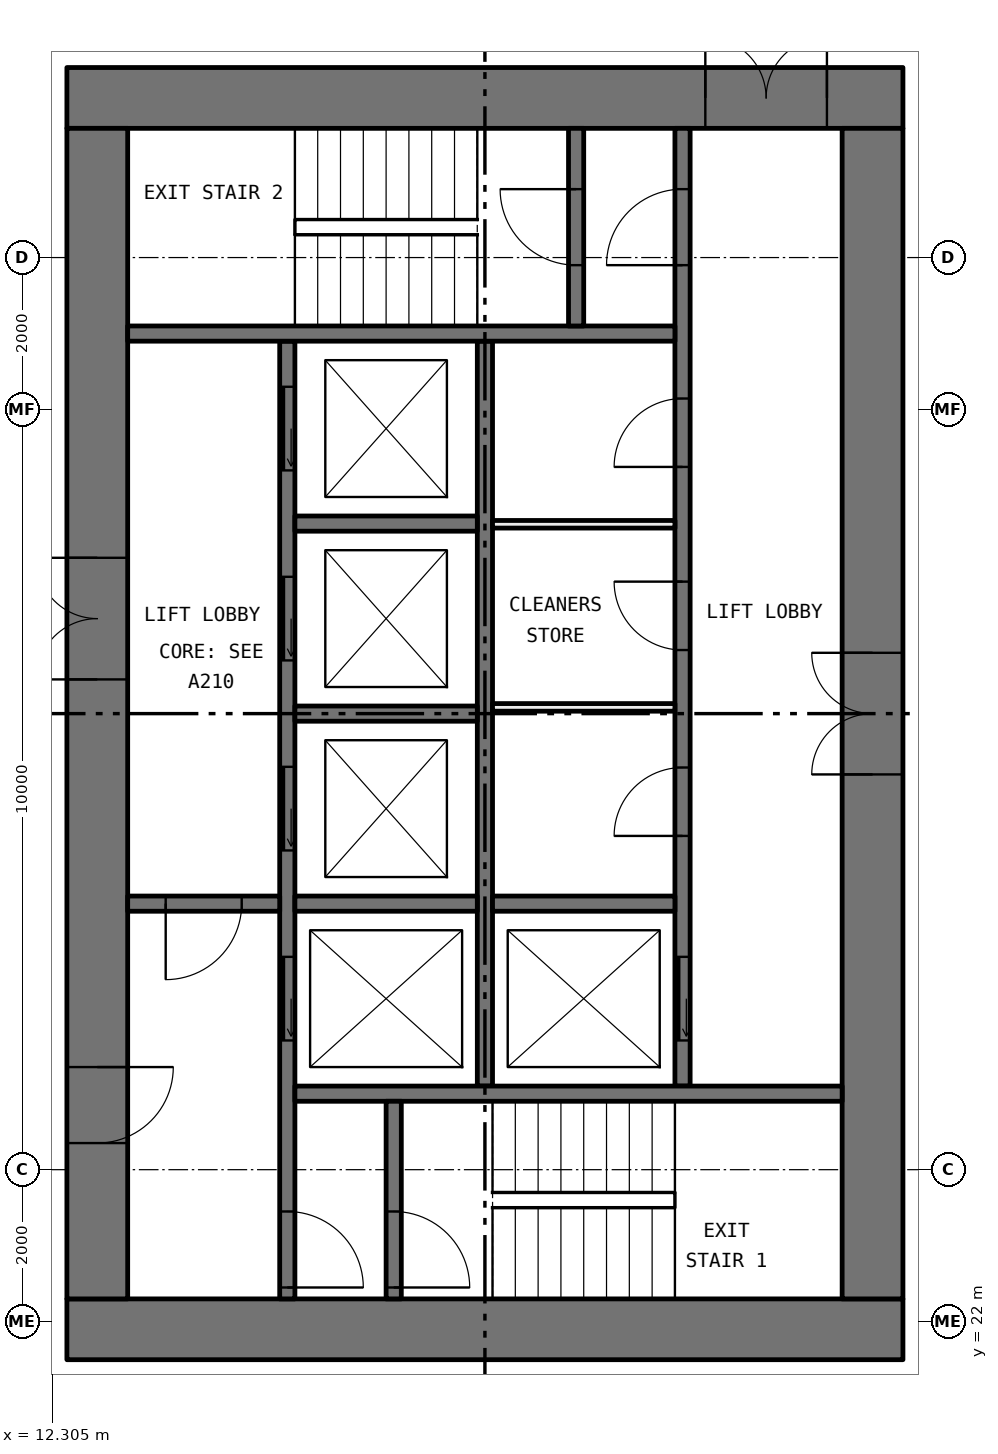
"""IFC4 building model, lengths in metres.
Left out: names, types, materials, properties, quantities, classifications, styles, units other than length and angle.
Written with IfcOpenShell. Run it as: python <this file> out.ifc"""

import sys

from ifc_helpers import new_model, si_unit, direction, frame, frame_2d, origin, place, context, subcontext, project, spatial, rectangle, extrude, element, fill, save


model = new_model("IFC4")
c1 = context("Model", 3, precision=1e-05, world=origin(), true_north=direction((0.0, 1.0)))
c2 = subcontext(c1, "Body", "Model", "MODEL_VIEW")
j1 = project(units=[si_unit("LENGTHUNIT", "METRE"), si_unit("PLANEANGLEUNIT", "RADIAN")], contexts=[c1])
p1 = place(None, origin())
s1 = spatial("IfcSite", under=j1, at=p1, CompositionType="ELEMENT")
p2 = place(p1, origin())
s2 = spatial("IfcBuilding", under=s1, at=p2, CompositionType="ELEMENT")
p3 = place(p2, frame((0.0, 0.0, 43.8)))
s3 = spatial("IfcBuildingStorey", under=s2, at=p3, CompositionType="ELEMENT", Elevation=43.8)
p4 = place(p3, frame((12.5, 21.9, 0.0), z_axis=(0.0, 0.0, 1.0), x_axis=(1.0, 0.0, 0.0)))
e1 = element("IfcWall", 1, at=p4, inside=s3, PredefinedType="SHEAR", context=c2, shape_type="SweptSolid", body=[
    extrude(rectangle(XDim=11.0, YDim=0.8, at=frame_2d((5.5, 0.0))), origin(), (0.0, 0.0, 1.0), 3.05),
])
p5 = place(p3, frame((12.5, 38.1, 0.0), z_axis=(0.0, 0.0, 1.0), x_axis=(1.0, 0.0, 0.0)))
e2 = element("IfcWall", 2, at=p5, inside=s3, PredefinedType="SHEAR", context=c2, shape_type="SweptSolid", body=[
    extrude(rectangle(XDim=11.0, YDim=0.8, at=frame_2d((5.5, 0.0))), origin(), (0.0, 0.0, 1.0), 3.05),
])
p6 = place(p5, frame((8.4, 0.0, 0.0)))
e3 = element("IfcOpeningElement", 3, at=p6, cuts=e2, PredefinedType="OPENING", context=c2, shape_type="SweptSolid", body=[
    extrude(rectangle(XDim=1.6, YDim=2.1, at=frame_2d((0.8, 1.05))), frame((0.0, 0.41, 0.0), z_axis=(0.0, -1.0, 0.0), x_axis=(1.0, 0.0, 0.0)), (0.0, 0.0, 1.0), 0.82),
])
p7 = place(p3, frame((12.9, 22.3, 0.0), z_axis=(0.0, 0.0, 1.0), x_axis=(0.0, 1.0, 0.0)))
e4 = element("IfcWall", 4, at=p7, inside=s3, PredefinedType="SHEAR", context=c2, shape_type="SweptSolid", body=[
    extrude(rectangle(XDim=15.4, YDim=0.8, at=frame_2d((7.7, 0.0))), origin(), (0.0, 0.0, 1.0), 3.05),
])
p8 = place(p7, frame((8.15, 0.0, 0.0)))
e5 = element("IfcOpeningElement", 5, at=p8, cuts=e4, PredefinedType="OPENING", context=c2, shape_type="SweptSolid", body=[
    extrude(rectangle(XDim=1.6, YDim=2.1, at=frame_2d((0.8, 1.05))), frame((0.0, 0.41, 0.0), z_axis=(0.0, -1.0, 0.0), x_axis=(1.0, 0.0, 0.0)), (0.0, 0.0, 1.0), 0.82),
])
p9 = place(p7, frame((2.05, 0.0, 0.0)))
e6 = element("IfcOpeningElement", 6, at=p9, cuts=e4, PredefinedType="OPENING", context=c2, shape_type="SweptSolid", body=[
    extrude(rectangle(XDim=1.0, YDim=2.1, at=frame_2d((0.5, 1.05))), frame((0.0, 0.41, 0.0), z_axis=(0.0, -1.0, 0.0), x_axis=(1.0, 0.0, 0.0)), (0.0, 0.0, 1.0), 0.82),
])
p10 = place(p3, frame((23.1, 22.3, 0.0), z_axis=(0.0, 0.0, 1.0), x_axis=(0.0, 1.0, 0.0)))
e7 = element("IfcWall", 7, at=p10, inside=s3, PredefinedType="SHEAR", context=c2, shape_type="SweptSolid", body=[
    extrude(rectangle(XDim=15.4, YDim=0.8, at=frame_2d((7.7, 0.0))), origin(), (0.0, 0.0, 1.0), 3.05),
])
p11 = place(p10, frame((6.9, 0.0, 0.0)))
e8 = element("IfcOpeningElement", 8, at=p11, cuts=e7, PredefinedType="OPENING", context=c2, shape_type="SweptSolid", body=[
    extrude(rectangle(XDim=1.6, YDim=2.1, at=frame_2d((0.8, 1.05))), frame((0.0, 0.41, 0.0), z_axis=(0.0, -1.0, 0.0), x_axis=(1.0, 0.0, 0.0)), (0.0, 0.0, 1.0), 0.82),
])
p12 = place(p3, frame((15.4, 22.3, 0.0), z_axis=(0.0, 0.0, 1.0), x_axis=(0.0, 1.0, 0.0)))
e9 = element("IfcWall", 9, at=p12, inside=s3, PredefinedType="SOLIDWALL", context=c2, shape_type="SweptSolid", body=[
    extrude(rectangle(XDim=12.6, YDim=0.2, at=frame_2d((6.3, 0.0))), origin(), (0.0, 0.0, 1.0), 3.05),
])
p13 = place(p12, frame((3.4, 0.0, 0.0)))
e10 = element("IfcOpeningElement", 10, at=p13, cuts=e9, PredefinedType="OPENING", context=c2, shape_type="SweptSolid", body=[
    extrude(rectangle(XDim=1.1, YDim=2.1, at=frame_2d((0.55, 1.05))), frame((0.0, 0.11, 0.0), z_axis=(0.0, -1.0, 0.0), x_axis=(1.0, 0.0, 0.0)), (0.0, 0.0, 1.0), 0.22),
])
p14 = place(p12, frame((5.9, 0.0, 0.0)))
e11 = element("IfcOpeningElement", 11, at=p14, cuts=e9, PredefinedType="OPENING", context=c2, shape_type="SweptSolid", body=[
    extrude(rectangle(XDim=1.1, YDim=2.1, at=frame_2d((0.55, 1.05))), frame((0.0, 0.11, 0.0), z_axis=(0.0, -1.0, 0.0), x_axis=(1.0, 0.0, 0.0)), (0.0, 0.0, 1.0), 0.22),
])
p15 = place(p12, frame((8.4, 0.0, 0.0)))
e12 = element("IfcOpeningElement", 12, at=p15, cuts=e9, PredefinedType="OPENING", context=c2, shape_type="SweptSolid", body=[
    extrude(rectangle(XDim=1.1, YDim=2.1, at=frame_2d((0.55, 1.05))), frame((0.0, 0.11, 0.0), z_axis=(0.0, -1.0, 0.0), x_axis=(1.0, 0.0, 0.0)), (0.0, 0.0, 1.0), 0.22),
])
p16 = place(p12, frame((10.9, 0.0, 0.0)))
e13 = element("IfcOpeningElement", 13, at=p16, cuts=e9, PredefinedType="OPENING", context=c2, shape_type="SweptSolid", body=[
    extrude(rectangle(XDim=1.1, YDim=2.1, at=frame_2d((0.55, 1.05))), frame((0.0, 0.11, 0.0), z_axis=(0.0, -1.0, 0.0), x_axis=(1.0, 0.0, 0.0)), (0.0, 0.0, 1.0), 0.22),
])
p17 = place(p12, frame((0.15, 0.0, 0.0)))
e14 = element("IfcOpeningElement", 14, at=p17, cuts=e9, PredefinedType="OPENING", context=c2, shape_type="SweptSolid", body=[
    extrude(rectangle(XDim=1.0, YDim=2.1, at=frame_2d((0.5, 1.05))), frame((0.0, 0.11, 0.0), z_axis=(0.0, -1.0, 0.0), x_axis=(1.0, 0.0, 0.0)), (0.0, 0.0, 1.0), 0.22),
])
p18 = place(p3, frame((20.6, 25.1, 0.0), z_axis=(0.0, 0.0, 1.0), x_axis=(0.0, 1.0, 0.0)))
e15 = element("IfcWall", 15, at=p18, inside=s3, PredefinedType="SOLIDWALL", context=c2, shape_type="SweptSolid", body=[
    extrude(rectangle(XDim=12.6, YDim=0.2, at=frame_2d((6.3, 0.0))), origin(), (0.0, 0.0, 1.0), 3.05),
])
p19 = place(p18, frame((0.6, 0.0, 0.0)))
e16 = element("IfcOpeningElement", 16, at=p19, cuts=e15, PredefinedType="OPENING", context=c2, shape_type="SweptSolid", body=[
    extrude(rectangle(XDim=1.1, YDim=2.1, at=frame_2d((0.55, 1.05))), frame((0.0, 0.11, 0.0), z_axis=(0.0, -1.0, 0.0), x_axis=(1.0, 0.0, 0.0)), (0.0, 0.0, 1.0), 0.22),
])
p20 = place(p18, frame((10.8, 0.0, 0.0)))
e17 = element("IfcOpeningElement", 17, at=p20, cuts=e15, PredefinedType="OPENING", context=c2, shape_type="SweptSolid", body=[
    extrude(rectangle(XDim=1.0, YDim=2.1, at=frame_2d((0.5, 1.05))), frame((0.0, 0.11, 0.0), z_axis=(0.0, -1.0, 0.0), x_axis=(1.0, 0.0, 0.0)), (0.0, 0.0, 1.0), 0.22),
])
p21 = place(p18, frame((3.291, 0.0, 0.0)))
e18 = element("IfcOpeningElement", 18, at=p21, cuts=e15, PredefinedType="OPENING", context=c2, shape_type="SweptSolid", body=[
    extrude(rectangle(XDim=0.9, YDim=2.1, at=frame_2d((0.45, 1.05))), frame((0.0, 0.11, 0.0), z_axis=(0.0, -1.0, 0.0), x_axis=(1.0, 0.0, 0.0)), (0.0, 0.0, 1.0), 0.22),
])
p22 = place(p18, frame((5.737, 0.0, 0.0)))
e19 = element("IfcOpeningElement", 19, at=p22, cuts=e15, PredefinedType="OPENING", context=c2, shape_type="SweptSolid", body=[
    extrude(rectangle(XDim=0.9, YDim=2.1, at=frame_2d((0.45, 1.05))), frame((0.0, 0.11, 0.0), z_axis=(0.0, -1.0, 0.0), x_axis=(1.0, 0.0, 0.0)), (0.0, 0.0, 1.0), 0.22),
])
p23 = place(p18, frame((8.146, 0.0, 0.0)))
e20 = element("IfcOpeningElement", 20, at=p23, cuts=e15, PredefinedType="OPENING", context=c2, shape_type="SweptSolid", body=[
    extrude(rectangle(XDim=0.9, YDim=2.1, at=frame_2d((0.45, 1.05))), frame((0.0, 0.11, 0.0), z_axis=(0.0, -1.0, 0.0), x_axis=(1.0, 0.0, 0.0)), (0.0, 0.0, 1.0), 0.22),
])
p24 = place(p3, frame((18.0, 25.1, 0.0), z_axis=(0.0, 0.0, 1.0), x_axis=(0.0, 1.0, 0.0)))
e21 = element("IfcWall", 21, at=p24, inside=s3, PredefinedType="SOLIDWALL", context=c2, shape_type="SweptSolid", body=[
    extrude(rectangle(XDim=9.8, YDim=0.2, at=frame_2d((4.9, 0.0))), origin(), (0.0, 0.0, 1.0), 3.05),
])
for number, where, z_axis, x_axis in (
    (22, (15.5, 25.0, 0.0), (0.0, 0.0, 1.0), (1.0, 0.0, 0.0)),
    (23, (13.3, 35.0, 0.0), (0.0, 0.0, 1.0), (1.0, 0.0, 0.0)),
):
    element("IfcWall", number, at=place(p3, frame(where, z_axis=z_axis, x_axis=x_axis)), inside=s3, PredefinedType="SOLIDWALL", context=c2, shape_type="SweptSolid", body=[
        extrude(rectangle(XDim=7.2, YDim=0.2, at=frame_2d((3.6, 0.0))), origin(), (0.0, 0.0, 1.0), 3.05),
    ])
p25 = place(p3, frame((13.3, 27.5, 0.0), z_axis=(0.0, 0.0, 1.0), x_axis=(1.0, 0.0, 0.0)))
e24 = element("IfcWall", 24, at=p25, inside=s3, PredefinedType="SOLIDWALL", context=c2, shape_type="SweptSolid", body=[
    extrude(rectangle(XDim=2.0, YDim=0.2, at=frame_2d((1.0, 0.0))), origin(), (0.0, 0.0, 1.0), 3.05),
])
p26 = place(p25, frame((0.5, 0.0, 0.0)))
e25 = element("IfcOpeningElement", 25, at=p26, cuts=e24, PredefinedType="OPENING", context=c2, shape_type="SweptSolid", body=[
    extrude(rectangle(XDim=1.0, YDim=2.1, at=frame_2d((0.5, 1.05))), frame((0.0, 0.11, 0.0), z_axis=(0.0, -1.0, 0.0), x_axis=(1.0, 0.0, 0.0)), (0.0, 0.0, 1.0), 0.22),
])
p27 = place(p3, frame((16.8, 22.3, 0.0), z_axis=(0.0, 0.0, 1.0), x_axis=(0.0, 1.0, 0.0)))
e26 = element("IfcWall", 26, at=p27, inside=s3, PredefinedType="SOLIDWALL", context=c2, shape_type="SweptSolid", body=[
    extrude(rectangle(XDim=2.6, YDim=0.2, at=frame_2d((1.3, 0.0))), origin(), (0.0, 0.0, 1.0), 3.05),
])
p28 = place(p27, frame((0.15, 0.0, 0.0)))
e27 = element("IfcOpeningElement", 27, at=p28, cuts=e26, PredefinedType="OPENING", context=c2, shape_type="SweptSolid", body=[
    extrude(rectangle(XDim=1.0, YDim=2.1, at=frame_2d((0.5, 1.05))), frame((0.0, 0.11, 0.0), z_axis=(0.0, -1.0, 0.0), x_axis=(1.0, 0.0, 0.0)), (0.0, 0.0, 1.0), 0.22),
])
p29 = place(p3, frame((19.2, 35.1, 0.0), z_axis=(0.0, 0.0, 1.0), x_axis=(0.0, 1.0, 0.0)))
e28 = element("IfcWall", 28, at=p29, inside=s3, PredefinedType="SOLIDWALL", context=c2, shape_type="SweptSolid", body=[
    extrude(rectangle(XDim=2.6, YDim=0.2, at=frame_2d((1.3, 0.0))), origin(), (0.0, 0.0, 1.0), 3.05),
])
p30 = place(p29, frame((0.8, 0.0, 0.0)))
e29 = element("IfcOpeningElement", 29, at=p30, cuts=e28, PredefinedType="OPENING", context=c2, shape_type="SweptSolid", body=[
    extrude(rectangle(XDim=1.0, YDim=2.1, at=frame_2d((0.5, 1.05))), frame((0.0, 0.11, 0.0), z_axis=(0.0, -1.0, 0.0), x_axis=(1.0, 0.0, 0.0)), (0.0, 0.0, 1.0), 0.22),
])
for number, where, z_axis, x_axis in (
    (30, (15.5, 27.5, 0.0), (0.0, 0.0, 1.0), (1.0, 0.0, 0.0)),
    (31, (15.5, 30.0, 0.0), (0.0, 0.0, 1.0), (1.0, 0.0, 0.0)),
    (32, (15.5, 32.5, 0.0), (0.0, 0.0, 1.0), (1.0, 0.0, 0.0)),
    (33, (18.1, 27.5, 0.0), (0.0, 0.0, 1.0), (1.0, 0.0, 0.0)),
):
    element("IfcWall", number, at=place(p3, frame(where, z_axis=z_axis, x_axis=x_axis)), inside=s3, PredefinedType="SOLIDWALL", context=c2, shape_type="SweptSolid", body=[
        extrude(rectangle(XDim=2.4, YDim=0.2, at=frame_2d((1.2, 0.0))), origin(), (0.0, 0.0, 1.0), 3.05),
    ])
for number, where, z_axis, x_axis in (
    (34, (18.1, 30.082, 0.0), (0.0, 0.0, 1.0), (1.0, 0.0, 0.0)),
    (35, (18.1, 32.491, 0.0), (0.0, 0.0, 1.0), (1.0, 0.0, 0.0)),
):
    element("IfcWall", number, at=place(p3, frame(where, z_axis=z_axis, x_axis=x_axis)), inside=s3, PredefinedType="PARTITIONING", context=c2, shape_type="SweptSolid", body=[
        extrude(rectangle(XDim=2.4, YDim=0.1, at=frame_2d((1.2, 0.0))), origin(), (0.0, 0.0, 1.0), 3.05),
    ])
p31 = place(p19, origin())
e36 = element("IfcDoor", 36, at=p31, inside=s3, OperationType="SLIDING_TO_LEFT", PredefinedType="DOOR", context=c2, shape_type="SweptSolid", body=[
    extrude(rectangle(XDim=1.1, YDim=2.1, at=frame_2d((0.55, 1.05))), frame((0.0, 0.025, 0.0), z_axis=(0.0, -1.0, 0.0), x_axis=(1.0, 0.0, 0.0)), (0.0, 0.0, 1.0), 0.05),
])
fill(e16, e36)
p32 = place(p13, origin())
e37 = element("IfcDoor", 37, at=p32, inside=s3, OperationType="SLIDING_TO_LEFT", PredefinedType="DOOR", context=c2, shape_type="SweptSolid", body=[
    extrude(rectangle(XDim=1.1, YDim=2.1, at=frame_2d((0.55, 1.05))), frame((0.0, 0.025, 0.0), z_axis=(0.0, -1.0, 0.0), x_axis=(1.0, 0.0, 0.0)), (0.0, 0.0, 1.0), 0.05),
])
fill(e10, e37)
p33 = place(p14, origin())
e38 = element("IfcDoor", 38, at=p33, inside=s3, OperationType="SLIDING_TO_LEFT", PredefinedType="DOOR", context=c2, shape_type="SweptSolid", body=[
    extrude(rectangle(XDim=1.1, YDim=2.1, at=frame_2d((0.55, 1.05))), frame((0.0, 0.025, 0.0), z_axis=(0.0, -1.0, 0.0), x_axis=(1.0, 0.0, 0.0)), (0.0, 0.0, 1.0), 0.05),
])
fill(e11, e38)
p34 = place(p15, origin())
e39 = element("IfcDoor", 39, at=p34, inside=s3, OperationType="SLIDING_TO_LEFT", PredefinedType="DOOR", context=c2, shape_type="SweptSolid", body=[
    extrude(rectangle(XDim=1.1, YDim=2.1, at=frame_2d((0.55, 1.05))), frame((0.0, 0.025, 0.0), z_axis=(0.0, -1.0, 0.0), x_axis=(1.0, 0.0, 0.0)), (0.0, 0.0, 1.0), 0.05),
])
fill(e12, e39)
p35 = place(p16, origin())
e40 = element("IfcDoor", 40, at=p35, inside=s3, OperationType="SLIDING_TO_LEFT", PredefinedType="DOOR", context=c2, shape_type="SweptSolid", body=[
    extrude(rectangle(XDim=1.1, YDim=2.1, at=frame_2d((0.55, 1.05))), frame((0.0, 0.025, 0.0), z_axis=(0.0, -1.0, 0.0), x_axis=(1.0, 0.0, 0.0)), (0.0, 0.0, 1.0), 0.05),
])
fill(e13, e40)
p36 = place(p28, frame((1.0, 0.0, 0.0), x_axis=(-1.0, 0.0, 0.0)))
e41 = element("IfcDoor", 41, at=p36, inside=s3, OperationType="SINGLE_SWING_LEFT", PredefinedType="DOOR", context=c2, shape_type="SweptSolid", body=[
    extrude(rectangle(XDim=1.0, YDim=2.1, at=frame_2d((0.5, 1.05))), frame((0.0, 0.025, 0.0), z_axis=(0.0, -1.0, 0.0), x_axis=(1.0, 0.0, 0.0)), (0.0, 0.0, 1.0), 0.05),
])
fill(e27, e41)
p37 = place(p17, frame((1.0, 0.0, 0.0), x_axis=(-1.0, 0.0, 0.0)))
e42 = element("IfcDoor", 42, at=p37, inside=s3, OperationType="SINGLE_SWING_LEFT", PredefinedType="DOOR", context=c2, shape_type="SweptSolid", body=[
    extrude(rectangle(XDim=1.0, YDim=2.1, at=frame_2d((0.5, 1.05))), frame((0.0, 0.025, 0.0), z_axis=(0.0, -1.0, 0.0), x_axis=(1.0, 0.0, 0.0)), (0.0, 0.0, 1.0), 0.05),
])
fill(e14, e42)
p38 = place(p20, origin())
e43 = element("IfcDoor", 43, at=p38, inside=s3, OperationType="SINGLE_SWING_RIGHT", PredefinedType="DOOR", context=c2, shape_type="SweptSolid", body=[
    extrude(rectangle(XDim=1.0, YDim=2.1, at=frame_2d((0.5, 1.05))), frame((0.0, 0.025, 0.0), z_axis=(0.0, -1.0, 0.0), x_axis=(1.0, 0.0, 0.0)), (0.0, 0.0, 1.0), 0.05),
])
fill(e17, e43)
p39 = place(p30, origin())
e44 = element("IfcDoor", 44, at=p39, inside=s3, OperationType="SINGLE_SWING_LEFT", PredefinedType="DOOR", context=c2, shape_type="SweptSolid", body=[
    extrude(rectangle(XDim=1.0, YDim=2.1, at=frame_2d((0.5, 1.05))), frame((0.0, 0.025, 0.0), z_axis=(0.0, -1.0, 0.0), x_axis=(1.0, 0.0, 0.0)), (0.0, 0.0, 1.0), 0.05),
])
fill(e29, e44)
p40 = place(p26, frame((1.0, 0.0, 0.0), x_axis=(-1.0, 0.0, 0.0)))
e45 = element("IfcDoor", 45, at=p40, inside=s3, OperationType="SINGLE_SWING_LEFT", PredefinedType="DOOR", context=c2, shape_type="SweptSolid", body=[
    extrude(rectangle(XDim=1.0, YDim=2.1, at=frame_2d((0.5, 1.05))), frame((0.0, 0.025, 0.0), z_axis=(0.0, -1.0, 0.0), x_axis=(1.0, 0.0, 0.0)), (0.0, 0.0, 1.0), 0.05),
])
fill(e25, e45)
p41 = place(p8, origin())
e46 = element("IfcDoor", 46, at=p41, inside=s3, OperationType="DOUBLE_DOOR_SINGLE_SWING", PredefinedType="DOOR", context=c2, shape_type="SweptSolid", body=[
    extrude(rectangle(XDim=1.6, YDim=2.1, at=frame_2d((0.8, 1.05))), frame((0.0, 0.025, 0.0), z_axis=(0.0, -1.0, 0.0), x_axis=(1.0, 0.0, 0.0)), (0.0, 0.0, 1.0), 0.05),
])
fill(e5, e46)
p42 = place(p9, frame((1.0, 0.0, 0.0), x_axis=(-1.0, 0.0, 0.0)))
e47 = element("IfcDoor", 47, at=p42, inside=s3, OperationType="SINGLE_SWING_RIGHT", PredefinedType="DOOR", context=c2, shape_type="SweptSolid", body=[
    extrude(rectangle(XDim=1.0, YDim=2.1, at=frame_2d((0.5, 1.05))), frame((0.0, 0.025, 0.0), z_axis=(0.0, -1.0, 0.0), x_axis=(1.0, 0.0, 0.0)), (0.0, 0.0, 1.0), 0.05),
])
fill(e6, e47)
p43 = place(p6, origin())
e48 = element("IfcDoor", 48, at=p43, inside=s3, OperationType="DOUBLE_DOOR_SINGLE_SWING", PredefinedType="DOOR", context=c2, shape_type="SweptSolid", body=[
    extrude(rectangle(XDim=1.6, YDim=2.1, at=frame_2d((0.8, 1.05))), frame((0.0, 0.025, 0.0), z_axis=(0.0, -1.0, 0.0), x_axis=(1.0, 0.0, 0.0)), (0.0, 0.0, 1.0), 0.05),
])
fill(e3, e48)
p44 = place(p11, origin())
e49 = element("IfcDoor", 49, at=p44, inside=s3, OperationType="DOUBLE_DOOR_SINGLE_SWING", PredefinedType="DOOR", context=c2, shape_type="SweptSolid", body=[
    extrude(rectangle(XDim=1.6, YDim=2.1, at=frame_2d((0.8, 1.05))), frame((0.0, 0.025, 0.0), z_axis=(0.0, -1.0, 0.0), x_axis=(1.0, 0.0, 0.0)), (0.0, 0.0, 1.0), 0.05),
])
fill(e8, e49)
p45 = place(p21, origin())
e50 = element("IfcDoor", 50, at=p45, inside=s3, OperationType="SINGLE_SWING_RIGHT", PredefinedType="DOOR", context=c2, shape_type="SweptSolid", body=[
    extrude(rectangle(XDim=0.9, YDim=2.1, at=frame_2d((0.45, 1.05))), frame((0.0, 0.025, 0.0), z_axis=(0.0, -1.0, 0.0), x_axis=(1.0, 0.0, 0.0)), (0.0, 0.0, 1.0), 0.05),
])
fill(e18, e50)
p46 = place(p22, origin())
e51 = element("IfcDoor", 51, at=p46, inside=s3, OperationType="SINGLE_SWING_LEFT", PredefinedType="DOOR", context=c2, shape_type="SweptSolid", body=[
    extrude(rectangle(XDim=0.9, YDim=2.1, at=frame_2d((0.45, 1.05))), frame((0.0, 0.025, 0.0), z_axis=(0.0, -1.0, 0.0), x_axis=(1.0, 0.0, 0.0)), (0.0, 0.0, 1.0), 0.05),
])
fill(e19, e51)
p47 = place(p23, origin())
e52 = element("IfcDoor", 52, at=p47, inside=s3, OperationType="SINGLE_SWING_RIGHT", PredefinedType="DOOR", context=c2, shape_type="SweptSolid", body=[
    extrude(rectangle(XDim=0.9, YDim=2.1, at=frame_2d((0.45, 1.05))), frame((0.0, 0.025, 0.0), z_axis=(0.0, -1.0, 0.0), x_axis=(1.0, 0.0, 0.0)), (0.0, 0.0, 1.0), 0.05),
])
fill(e20, e52)
save(model, sys.argv[1])
